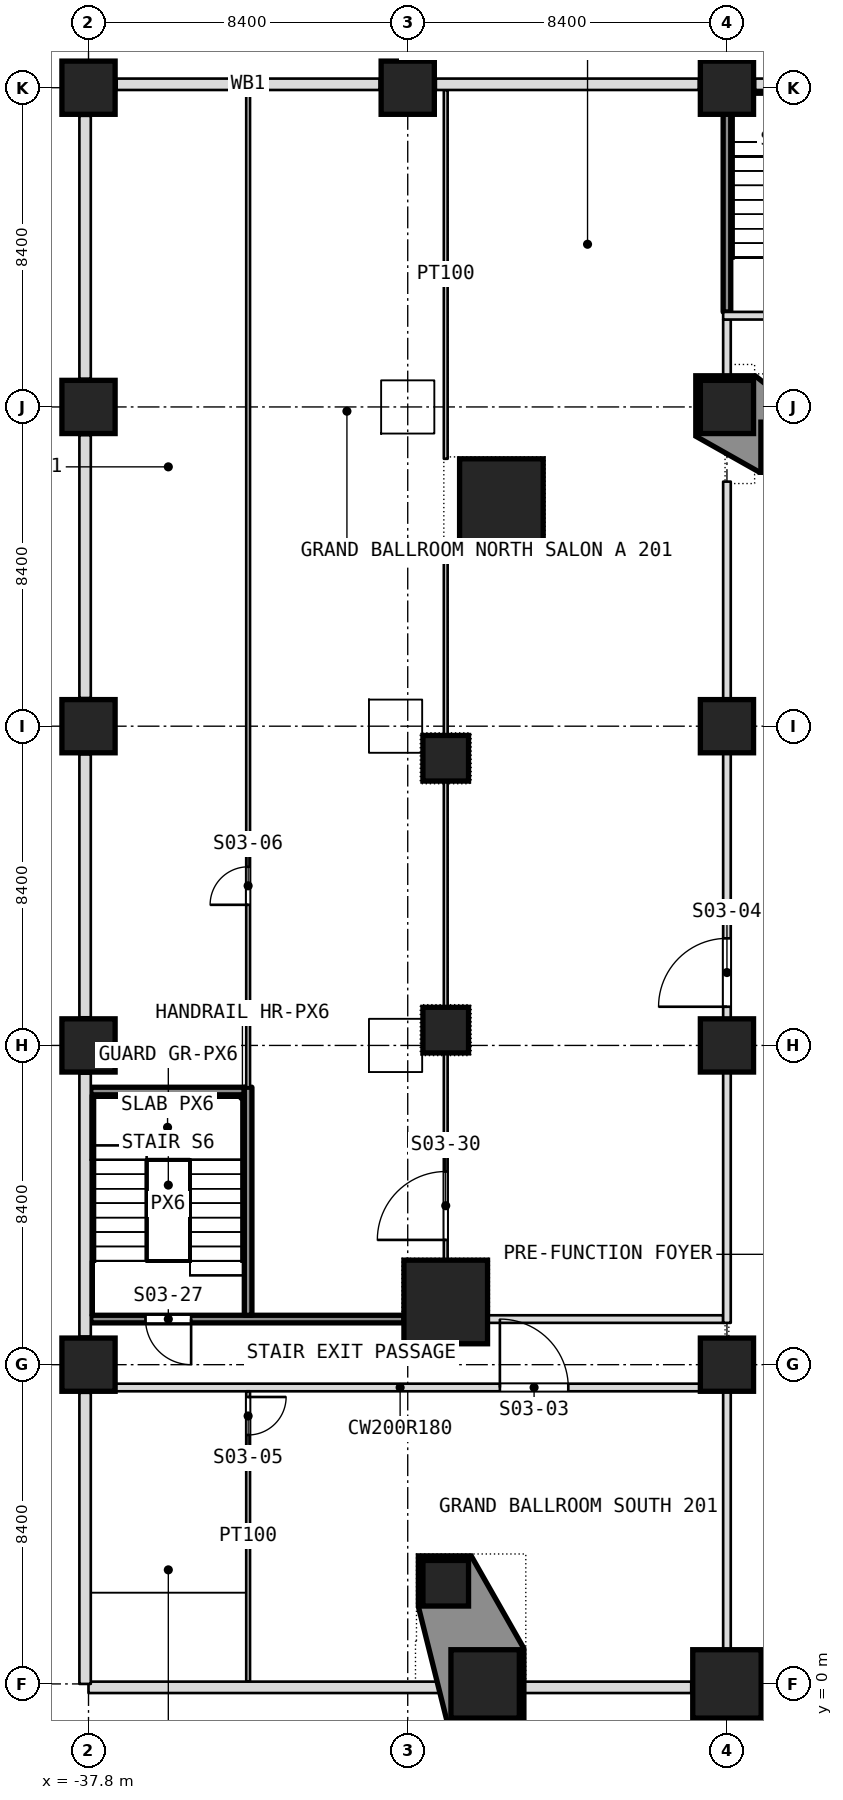
"""IFC4 building model, lengths in metres.
Left out: names, types, materials, properties, quantities, classifications, styles, units other than length and angle.
Written with IfcOpenShell. Run it as: python <this file> out.ifc"""

import sys

from ifc_helpers import new_model, si_unit, direction, frame, frame_2d, origin, origin_2d, place, context, subcontext, project, spatial, polyline, rectangle, outline, extrude, element, fill, save


model = new_model("IFC4")
c1 = context("Model", 3, precision=1e-05, world=origin(), true_north=direction((0.0, 1.0)))
c2 = subcontext(c1, "Body", "Model", "MODEL_VIEW")
j1 = project(units=[si_unit("LENGTHUNIT", "METRE"), si_unit("PLANEANGLEUNIT", "RADIAN")], contexts=[c1])
p1 = place(None, origin())
s1 = spatial("IfcSite", under=j1, at=p1, CompositionType="ELEMENT")
p2 = place(p1, origin())
s2 = spatial("IfcBuilding", under=s1, at=p2, CompositionType="ELEMENT")
p3 = place(p2, frame((0.0, 0.0, 13.0)))
s3 = spatial("IfcBuildingStorey", under=s2, at=p3, CompositionType="ELEMENT", Elevation=13.0)
p4 = place(p3, frame((-21.0, 0.0, 0.0), z_axis=(0.0, 0.0, 1.0), x_axis=(1.0, 0.0, 0.0)))
e1 = element("IfcColumn", 1, at=p4, inside=s3, PredefinedType="COLUMN", context=c2, shape_type="SweptSolid", body=[
    extrude(rectangle(XDim=1.8, YDim=1.8, at=origin_2d()), origin(), (0.0, 0.0, 1.0), 8.0),
])
for number, where, z_axis, x_axis in (
    (2, (-37.8, 8.4, 0.0), (0.0, 0.0, 1.0), (1.0, 0.0, 0.0)),
    (3, (-21.0, 8.4, 0.0), (0.0, 0.0, 1.0), (1.0, 0.0, 0.0)),
    (4, (-37.8, 16.8, 0.0), (0.0, 0.0, 1.0), (1.0, 0.0, 0.0)),
    (5, (-21.0, 16.8, 0.0), (0.0, 0.0, 1.0), (1.0, 0.0, 0.0)),
    (6, (-37.8, 25.2, 0.0), (0.0, 0.0, 1.0), (1.0, 0.0, 0.0)),
    (7, (-21.0, 25.2, 0.0), (0.0, 0.0, 1.0), (1.0, 0.0, 0.0)),
    (8, (-37.8, 33.6, 0.0), (0.0, 0.0, 1.0), (1.0, 0.0, 0.0)),
    (9, (-21.0, 33.6, 0.0), (0.0, 0.0, 1.0), (1.0, 0.0, 0.0)),
    (10, (-37.8, 42.0, 0.0), (0.0, 0.0, 1.0), (1.0, 0.0, 0.0)),
    (11, (-29.4, 42.0, 0.0), (0.0, 0.0, 1.0), (1.0, 0.0, 0.0)),
    (12, (-21.0, 42.0, 0.0), (0.0, 0.0, 1.0), (1.0, 0.0, 0.0)),
):
    element("IfcColumn", number, at=place(p3, frame(where, z_axis=z_axis, x_axis=x_axis)), inside=s3, PredefinedType="COLUMN", context=c2, shape_type="SweptSolid", body=[
        extrude(rectangle(XDim=1.4, YDim=1.4, at=origin_2d()), origin(), (0.0, 0.0, 1.0), 8.0),
    ])
p5 = place(p3, frame((-27.363, 0.0, 0.0), z_axis=(0.0, 0.0, 1.0), x_axis=(1.0, 0.0, 0.0)))
e13 = element("IfcColumn", 13, at=p5, inside=s3, PredefinedType="COLUMN", context=c2, shape_type="SweptSolid", body=[
    extrude(rectangle(XDim=1.8, YDim=1.8, at=origin_2d()), origin(), (0.0, 0.0, 1.0), 8.0),
])
for number, where, z_axis, x_axis in (
    (14, (-28.4, 10.05, 0.0), (0.0, 0.0, 1.0), (1.0, 0.0, 0.0)),
    (15, (-26.936, 31.135, 0.0), (0.0, 0.0, 1.0), (1.0, 0.0, 0.0)),
):
    element("IfcColumn", number, at=place(p3, frame(where, z_axis=z_axis, x_axis=x_axis)), inside=s3, PredefinedType="COLUMN", context=c2, shape_type="SweptSolid", body=[
        extrude(rectangle(XDim=2.2, YDim=2.2, at=origin_2d()), origin(), (0.0, 0.0, 1.0), 8.0),
    ])
p6 = place(p3, frame((-37.8, 2.4, 1.0), z_axis=(-1.0, 0.0, 0.0), x_axis=(0.0, -0.183897703887, 0.982945387346)))
e16 = element("IfcWall", 16, at=p6, inside=s3, PredefinedType="SOLIDWALL", context=c2, shape_type="SweptSolid", body=[
    extrude(outline(polyline([(0.0, 0.0), (6.525, 0.0), (7.156, -0.182), (6.881, 1.287), (0.0, 0.0)])), origin(), (0.0, 0.0, -1.0), 4.2),
])
for number, where, z_axis, x_axis in (
    (17, (-28.4, 2.649, 0.0), (0.0, 0.0, 1.0), (1.0, 0.0, 0.0)),
    (18, (-28.4, 17.203, 0.0), (0.0, 0.0, 1.0), (1.0, 0.0, 0.0)),
    (19, (-28.4, 24.356, 0.0), (0.0, 0.0, 1.0), (1.0, 0.0, 0.0)),
    (20, (-19.507, 32.6, 0.0), (0.0, 0.0, 1.0), (1.0, 0.0, 0.0)),
):
    element("IfcColumn", number, at=place(p3, frame(where, z_axis=z_axis, x_axis=x_axis)), inside=s3, PredefinedType="COLUMN", context=c2, shape_type="SweptSolid", body=[
        extrude(rectangle(XDim=1.2, YDim=1.2, at=origin_2d()), origin(), (0.0, 0.0, 1.0), 8.0),
    ])
p7 = place(p3, frame((-38.1, 7.8, 0.0), z_axis=(0.0, 0.0, 1.0), x_axis=(1.0, 0.0, 0.0)))
e21 = element("IfcWall", 21, at=p7, inside=s3, PredefinedType="PARTITIONING", context=c2, shape_type="SweptSolid", body=[
    extrude(rectangle(XDim=17.0, YDim=0.2, at=frame_2d((8.5, 0.0))), origin(), (0.0, 0.0, 1.0), 7.68),
])
p8 = place(p7, frame((11.125, 0.0, 0.0)))
e22 = element("IfcOpeningElement", 22, at=p8, cuts=e21, PredefinedType="OPENING", context=c2, shape_type="SweptSolid", body=[
    extrude(rectangle(XDim=1.8, YDim=2.1, at=frame_2d((0.9, 1.05))), frame((0.0, 0.1, 0.0), z_axis=(0.0, -1.0, 0.0), x_axis=(1.0, 0.0, 0.0)), (0.0, 0.0, 1.0), 0.2),
])
p9 = place(p3, frame((-37.74, 9.6, 0.0), z_axis=(0.0, 0.0, 1.0), x_axis=(1.0, 0.0, 0.0)))
e23 = element("IfcWall", 23, at=p9, inside=s3, PredefinedType="PARTITIONING", context=c2, shape_type="SweptSolid", body=[
    extrude(rectangle(XDim=8.24, YDim=0.2, at=frame_2d((4.12, 0.0))), origin(), (0.0, 0.0, 1.0), 7.68),
])
p10 = place(p9, frame((1.44, 0.0, 0.0)))
e24 = element("IfcOpeningElement", 24, at=p10, cuts=e23, PredefinedType="OPENING", context=c2, shape_type="SweptSolid", body=[
    extrude(rectangle(XDim=1.2, YDim=2.1, at=frame_2d((0.6, 1.05))), frame((0.0, 0.1, 0.0), z_axis=(0.0, -1.0, 0.0), x_axis=(1.0, 0.0, 0.0)), (0.0, 0.0, 1.0), 0.2),
])
p11 = place(p3, frame((-27.3, 9.6, 0.0), z_axis=(0.0, 0.0, 1.0), x_axis=(1.0, 0.0, 0.0)))
e25 = element("IfcWall", 25, at=p11, inside=s3, PredefinedType="PARTITIONING", context=c2, shape_type="SweptSolid", body=[
    extrude(rectangle(XDim=6.2, YDim=0.2, at=frame_2d((3.1, 0.0))), origin(), (0.0, 0.0, 1.0), 7.68),
])
p12 = place(p3, frame((-37.74, 15.6, 0.0), z_axis=(0.0, 0.0, 1.0), x_axis=(1.0, 0.0, 0.0)))
e26 = element("IfcWall", 26, at=p12, inside=s3, PredefinedType="PARTITIONING", context=c2, shape_type="SweptSolid", body=[
    extrude(rectangle(XDim=4.04, YDim=0.2, at=frame_2d((2.02, 0.0))), origin(), (0.0, 0.0, 1.0), 7.68),
])
p13 = place(p3, frame((-21.0, -0.3, 0.0), z_axis=(0.0, 0.0, 1.0), x_axis=(0.0, 1.0, 0.0)))
e27 = element("IfcWall", 27, at=p13, inside=s3, PredefinedType="PARTITIONING", context=c2, shape_type="SweptSolid", body=[
    extrude(rectangle(XDim=8.2, YDim=0.2, at=frame_2d((4.1, 0.0))), origin(), (0.0, 0.0, 1.0), 7.68),
])
p14 = place(p3, frame((-21.0, 9.5, 0.0), z_axis=(0.0, 0.0, 1.0), x_axis=(0.0, 1.0, 0.0)))
e28 = element("IfcWall", 28, at=p14, inside=s3, PredefinedType="PARTITIONING", context=c2, shape_type="SweptSolid", body=[
    extrude(rectangle(XDim=22.135, YDim=0.2, at=frame_2d((11.067, 0.0))), origin(), (0.0, 0.0, 1.0), 7.68),
])
p15 = place(p14, frame((8.318, 0.0, 0.0)))
e29 = element("IfcOpeningElement", 29, at=p15, cuts=e28, PredefinedType="OPENING", context=c2, shape_type="SweptSolid", body=[
    extrude(rectangle(XDim=1.8, YDim=2.1, at=frame_2d((0.9, 1.05))), frame((0.0, 0.1, 0.0), z_axis=(0.0, -1.0, 0.0), x_axis=(1.0, 0.0, 0.0)), (0.0, 0.0, 1.0), 0.2),
])
p16 = place(p3, frame((-21.0, 34.42, 0.0), z_axis=(0.0, 0.0, 1.0), x_axis=(0.0, 1.0, 0.0)))
e30 = element("IfcWall", 30, at=p16, inside=s3, PredefinedType="PARTITIONING", context=c2, shape_type="SweptSolid", body=[
    extrude(rectangle(XDim=1.48, YDim=0.2, at=frame_2d((0.74, 0.0))), origin(), (0.0, 0.0, 1.0), 7.68),
])
p17 = place(p3, frame((-21.0, 36.1, 0.0), z_axis=(0.0, 0.0, 1.0), x_axis=(0.0, 1.0, 0.0)))
e31 = element("IfcWall", 31, at=p17, inside=s3, PredefinedType="PARTITIONING", context=c2, shape_type="SweptSolid", body=[
    extrude(rectangle(XDim=6.2, YDim=0.2, at=frame_2d((3.1, 0.0))), origin(), (0.0, 0.0, 1.0), 7.68),
])
p18 = place(p3, frame((-28.4, 11.15, 0.0), z_axis=(0.0, 0.0, 1.0), x_axis=(0.0, 1.0, 0.0)))
e32 = element("IfcWall", 32, at=p18, inside=s3, PredefinedType="PARTITIONING", context=c2, shape_type="SweptSolid", body=[
    extrude(rectangle(XDim=5.433, YDim=0.1, at=frame_2d((2.717, 0.0))), origin(), (0.0, 0.0, 1.0), 7.68),
])
p19 = place(p18, frame((0.533, 0.0, 0.0)))
e33 = element("IfcOpeningElement", 33, at=p19, cuts=e32, PredefinedType="OPENING", context=c2, shape_type="SweptSolid", body=[
    extrude(rectangle(XDim=1.8, YDim=2.1, at=frame_2d((0.9, 1.05))), frame((0.0, 0.05, 0.0), z_axis=(0.0, -1.0, 0.0), x_axis=(1.0, 0.0, 0.0)), (0.0, 0.0, 1.0), 0.1),
])
p20 = place(p3, frame((-28.4, 17.823, 0.0), z_axis=(0.0, 0.0, 1.0), x_axis=(0.0, 1.0, 0.0)))
e34 = element("IfcWall", 34, at=p20, inside=s3, PredefinedType="PARTITIONING", context=c2, shape_type="SweptSolid", body=[
    extrude(rectangle(XDim=5.913, YDim=0.1, at=frame_2d((2.957, 0.0))), origin(), (0.0, 0.0, 1.0), 7.68),
])
p21 = place(p3, frame((-28.4, 24.976, 0.0), z_axis=(0.0, 0.0, 1.0), x_axis=(0.0, 1.0, 0.0)))
e35 = element("IfcWall", 35, at=p21, inside=s3, PredefinedType="PARTITIONING", context=c2, shape_type="SweptSolid", body=[
    extrude(rectangle(XDim=5.06, YDim=0.1, at=frame_2d((2.53, 0.0))), origin(), (0.0, 0.0, 1.0), 7.68),
])
p22 = place(p3, frame((-28.4, 32.236, 0.0), z_axis=(0.0, 0.0, 1.0), x_axis=(0.0, 1.0, 0.0)))
e36 = element("IfcWall", 36, at=p22, inside=s3, PredefinedType="PARTITIONING", context=c2, shape_type="SweptSolid", body=[
    extrude(rectangle(XDim=9.704, YDim=0.1, at=frame_2d((4.852, 0.0))), origin(), (0.0, 0.0, 1.0), 7.68),
])
p23 = place(p3, frame((-33.6, 9.7, 0.0), z_axis=(0.0, 0.0, 1.0), x_axis=(0.0, 1.0, 0.0)))
e37 = element("IfcWall", 37, at=p23, inside=s3, PredefinedType="PARTITIONING", context=c2, shape_type="SweptSolid", body=[
    extrude(rectangle(XDim=6.0, YDim=0.2, at=frame_2d((3.0, 0.0))), origin(), (0.0, 0.0, 1.0), 7.68),
])
p24 = place(p3, frame((-33.6, 0.06, 0.0), z_axis=(0.0, 0.0, 1.0), x_axis=(0.0, 1.0, 0.0)))
e38 = element("IfcWall", 38, at=p24, inside=s3, PredefinedType="PARTITIONING", context=c2, shape_type="SweptSolid", body=[
    extrude(rectangle(XDim=7.64, YDim=0.1, at=frame_2d((3.82, 0.0))), origin(), (0.0, 0.0, 1.0), 7.68),
])
p25 = place(p24, frame((6.49, 0.0, 0.0)))
e39 = element("IfcOpeningElement", 39, at=p25, cuts=e38, PredefinedType="OPENING", context=c2, shape_type="SweptSolid", body=[
    extrude(rectangle(XDim=1.0, YDim=2.1, at=frame_2d((0.5, 1.05))), frame((0.0, 0.05, 0.0), z_axis=(0.0, -1.0, 0.0), x_axis=(1.0, 0.0, 0.0)), (0.0, 0.0, 1.0), 0.1),
])
p26 = place(p3, frame((-33.6, 15.7, 0.0), z_axis=(0.0, 0.0, 1.0), x_axis=(0.0, 1.0, 0.0)))
e40 = element("IfcWall", 40, at=p26, inside=s3, PredefinedType="PARTITIONING", context=c2, shape_type="SweptSolid", body=[
    extrude(rectangle(XDim=26.24, YDim=0.1, at=frame_2d((13.12, 0.0))), origin(), (0.0, 0.0, 1.0), 7.68),
])
p27 = place(p26, frame((4.8, 0.0, 0.0)))
e41 = element("IfcOpeningElement", 41, at=p27, cuts=e40, PredefinedType="OPENING", context=c2, shape_type="SweptSolid", body=[
    extrude(rectangle(XDim=1.0, YDim=2.1, at=frame_2d((0.5, 1.05))), frame((0.0, 0.05, 0.0), z_axis=(0.0, -1.0, 0.0), x_axis=(1.0, 0.0, 0.0)), (0.0, 0.0, 1.0), 0.1),
])
p28 = place(p3, frame((-21.1, 36.0, 0.0), z_axis=(0.0, 0.0, 1.0), x_axis=(1.0, 0.0, 0.0)))
e42 = element("IfcWall", 42, at=p28, inside=s3, PredefinedType="PARTITIONING", context=c2, shape_type="SweptSolid", body=[
    extrude(rectangle(XDim=23.3, YDim=0.2, at=frame_2d((11.65, 0.0))), origin(), (0.0, 0.0, 1.0), 7.68),
])
p29 = place(p28, frame((1.6, 0.0, 0.0)))
e43 = element("IfcOpeningElement", 43, at=p29, cuts=e42, PredefinedType="OPENING", context=c2, shape_type="SweptSolid", body=[
    extrude(rectangle(XDim=1.2, YDim=2.1, at=frame_2d((0.6, 1.05))), frame((0.0, 0.1, 0.0), z_axis=(0.0, -1.0, 0.0), x_axis=(1.0, 0.0, 0.0)), (0.0, 0.0, 1.0), 0.2),
])
p30 = place(p28, frame((11.15, 0.0, 0.0)))
e44 = element("IfcOpeningElement", 44, at=p30, cuts=e42, PredefinedType="OPENING", context=c2, shape_type="SweptSolid", body=[
    extrude(rectangle(XDim=1.0, YDim=2.1, at=frame_2d((0.5, 1.05))), frame((0.0, 0.1, 0.0), z_axis=(0.0, -1.0, 0.0), x_axis=(1.0, 0.0, 0.0)), (0.0, 0.0, 1.0), 0.2),
])
p31 = place(p28, frame((20.5, 0.0, 0.0)))
e45 = element("IfcOpeningElement", 45, at=p31, cuts=e42, PredefinedType="OPENING", context=c2, shape_type="SweptSolid", body=[
    extrude(rectangle(XDim=1.2, YDim=2.1, at=frame_2d((0.6, 1.05))), frame((0.0, 0.1, 0.0), z_axis=(0.0, -1.0, 0.0), x_axis=(1.0, 0.0, 0.0)), (0.0, 0.0, 1.0), 0.2),
])
p32 = place(p3, frame((-37.8, -0.09, 0.0), z_axis=(0.0, 0.0, 1.0), x_axis=(1.0, 0.0, 0.0)))
e46 = element("IfcWall", 46, at=p32, inside=s3, PredefinedType="NOTDEFINED", context=c2, shape_type="SweptSolid", body=[
    extrude(rectangle(XDim=9.497, YDim=0.3, at=frame_2d((4.749, 0.0))), origin(), (0.0, 0.0, 1.0), 6.78),
])
p33 = place(p3, frame((-26.423, -0.09, 0.0), z_axis=(0.0, 0.0, 1.0), x_axis=(1.0, 0.0, 0.0)))
e47 = element("IfcWall", 47, at=p33, inside=s3, PredefinedType="NOTDEFINED", context=c2, shape_type="SweptSolid", body=[
    extrude(rectangle(XDim=4.483, YDim=0.3, at=frame_2d((2.242, 0.0))), origin(), (0.0, 0.0, 1.0), 6.78),
])
p34 = place(p3, frame((-20.06, -0.09, 0.0), z_axis=(0.0, 0.0, 1.0), x_axis=(1.0, 0.0, 0.0)))
e48 = element("IfcWall", 48, at=p34, inside=s3, PredefinedType="NOTDEFINED", context=c2, shape_type="SweptSolid", body=[
    extrude(rectangle(XDim=3.26, YDim=0.3, at=frame_2d((1.63, 0.0))), origin(), (0.0, 0.0, 1.0), 8.0),
])
for number, where, z_axis, x_axis in (
    (49, (-13.34, 42.09, 0.0), (0.0, 0.0, 1.0), (-1.0, 0.0, 0.0)),
    (50, (-21.74, 42.09, 0.0), (0.0, 0.0, 1.0), (-1.0, 0.0, 0.0)),
):
    element("IfcWall", number, at=place(p3, frame(where, z_axis=z_axis, x_axis=x_axis)), inside=s3, PredefinedType="NOTDEFINED", context=c2, shape_type="SweptSolid", body=[
        extrude(rectangle(XDim=6.92, YDim=0.3, at=frame_2d((3.46, 0.0))), origin(), (0.0, 0.0, 1.0), 6.78),
    ])
p35 = place(p3, frame((-30.14, 42.09, 0.0), z_axis=(0.0, 0.0, 1.0), x_axis=(-1.0, 0.0, 0.0)))
e51 = element("IfcWall", 51, at=p35, inside=s3, PredefinedType="NOTDEFINED", context=c2, shape_type="SweptSolid", body=[
    extrude(rectangle(XDim=6.92, YDim=0.3, at=frame_2d((3.46, 0.0))), origin(), (0.0, 0.0, 1.0), 6.78),
])
p36 = place(p3, frame((-37.89, 41.26, 0.0), z_axis=(0.0, 0.0, 1.0), x_axis=(0.0, -1.0, 0.0)))
e52 = element("IfcWall", 52, at=p36, inside=s3, PredefinedType="NOTDEFINED", context=c2, shape_type="SweptSolid", body=[
    extrude(rectangle(XDim=6.92, YDim=0.3, at=frame_2d((3.46, 0.0))), origin(), (0.0, 0.0, 1.0), 6.78),
])
p37 = place(p3, frame((-37.89, 32.86, 0.0), z_axis=(0.0, 0.0, 1.0), x_axis=(0.0, -1.0, 0.0)))
e53 = element("IfcWall", 53, at=p37, inside=s3, PredefinedType="NOTDEFINED", context=c2, shape_type="SweptSolid", body=[
    extrude(rectangle(XDim=6.92, YDim=0.3, at=frame_2d((3.46, 0.0))), origin(), (0.0, 0.0, 1.0), 6.78),
])
p38 = place(p3, frame((-37.89, 24.46, 0.0), z_axis=(0.0, 0.0, 1.0), x_axis=(0.0, -1.0, 0.0)))
e54 = element("IfcWall", 54, at=p38, inside=s3, PredefinedType="NOTDEFINED", context=c2, shape_type="SweptSolid", body=[
    extrude(rectangle(XDim=6.92, YDim=0.3, at=frame_2d((3.46, 0.0))), origin(), (0.0, 0.0, 1.0), 6.78),
])
p39 = place(p3, frame((-37.89, 16.06, 0.0), z_axis=(0.0, 0.0, 1.0), x_axis=(0.0, -1.0, 0.0)))
e55 = element("IfcWall", 55, at=p39, inside=s3, PredefinedType="NOTDEFINED", context=c2, shape_type="SweptSolid", body=[
    extrude(rectangle(XDim=6.92, YDim=0.3, at=frame_2d((3.46, 0.0))), origin(), (0.0, 0.0, 1.0), 8.0),
])
p40 = place(p3, frame((-37.89, 7.66, 0.0), z_axis=(0.0, 0.0, 1.0), x_axis=(0.0, -1.0, 0.0)))
e56 = element("IfcWall", 56, at=p40, inside=s3, PredefinedType="NOTDEFINED", context=c2, shape_type="SweptSolid", body=[
    extrude(rectangle(XDim=7.66, YDim=0.3, at=frame_2d((3.83, 0.0))), origin(), (0.0, 0.0, 1.0), 6.78),
])
p41 = place(p3, origin())
e57 = element("IfcWall", 57, at=p41, inside=s3, PredefinedType="SOLIDWALL", context=c2, shape_type="SweptSolid", body=[
    extrude(outline(polyline([(-29.12, 2.034), (-29.12, 3.369), (-27.73, 3.369), (-26.343, 0.932), (-26.343, -1.02), (-28.357, -1.02), (-29.12, 2.034)]), holes=[polyline([(-28.263, -0.9), (-26.463, -0.9), (-26.463, 0.9), (-28.263, 0.9), (-28.263, -0.9)]), polyline([(-29.0, 2.049), (-27.8, 2.049), (-27.8, 3.249), (-29.0, 3.249), (-29.0, 2.049)])]), origin(), (0.0, 0.0, 1.0), 8.0),
])
p42 = place(p3, origin())
e58 = element("IfcWall", 58, at=p42, inside=s3, PredefinedType="SOLIDWALL", context=c2, shape_type="SweptSolid", body=[
    extrude(outline(polyline([(-21.82, 34.42), (-20.258, 34.42), (-18.787, 33.258), (-18.787, 31.88), (-20.138, 31.88), (-21.82, 32.83), (-21.82, 34.42)]), holes=[polyline([(-18.907, 32.0), (-18.907, 33.2), (-20.107, 33.2), (-20.107, 32.0), (-18.907, 32.0)]), polyline([(-20.3, 32.9), (-20.3, 34.3), (-21.7, 34.3), (-21.7, 32.9), (-20.3, 32.9)])]), origin(), (0.0, 0.0, 1.0), 8.0),
])
p43 = place(p8, origin())
e59 = element("IfcDoor", 59, at=p43, inside=s3, OperationType="DOUBLE_DOOR_SINGLE_SWING", PredefinedType="DOOR", context=c2, shape_type="SweptSolid", body=[
    extrude(rectangle(XDim=1.8, YDim=2.1, at=frame_2d((0.9, 1.05))), frame((0.0, 0.025, 0.0), z_axis=(0.0, -1.0, 0.0), x_axis=(1.0, 0.0, 0.0)), (0.0, 0.0, 1.0), 0.05),
])
fill(e22, e59)
p44 = place(p15, origin())
e60 = element("IfcDoor", 60, at=p44, inside=s3, OperationType="DOUBLE_DOOR_SINGLE_SWING", PredefinedType="DOOR", context=c2, shape_type="SweptSolid", body=[
    extrude(rectangle(XDim=1.8, YDim=2.1, at=frame_2d((0.9, 1.05))), frame((0.0, 0.025, 0.0), z_axis=(0.0, -1.0, 0.0), x_axis=(1.0, 0.0, 0.0)), (0.0, 0.0, 1.0), 0.05),
])
fill(e29, e60)
p45 = place(p25, origin())
e61 = element("IfcDoor", 61, at=p45, inside=s3, OperationType="SINGLE_SWING_RIGHT", PredefinedType="DOOR", context=c2, shape_type="SweptSolid", body=[
    extrude(rectangle(XDim=1.0, YDim=2.1, at=frame_2d((0.5, 1.05))), frame((0.0, 0.025, 0.0), z_axis=(0.0, -1.0, 0.0), x_axis=(1.0, 0.0, 0.0)), (0.0, 0.0, 1.0), 0.05),
])
fill(e39, e61)
p46 = place(p27, origin())
e62 = element("IfcDoor", 62, at=p46, inside=s3, OperationType="SINGLE_SWING_LEFT", PredefinedType="DOOR", context=c2, shape_type="SweptSolid", body=[
    extrude(rectangle(XDim=1.0, YDim=2.1, at=frame_2d((0.5, 1.05))), frame((0.0, 0.025, 0.0), z_axis=(0.0, -1.0, 0.0), x_axis=(1.0, 0.0, 0.0)), (0.0, 0.0, 1.0), 0.05),
])
fill(e41, e62)
p47 = place(p10, origin())
e63 = element("IfcDoor", 63, at=p47, inside=s3, OperationType="SINGLE_SWING_RIGHT", PredefinedType="DOOR", context=c2, shape_type="SweptSolid", body=[
    extrude(rectangle(XDim=1.2, YDim=2.1, at=frame_2d((0.6, 1.05))), frame((0.0, 0.025, 0.0), z_axis=(0.0, -1.0, 0.0), x_axis=(1.0, 0.0, 0.0)), (0.0, 0.0, 1.0), 0.05),
])
fill(e24, e63)
p48 = place(p19, origin())
e64 = element("IfcDoor", 64, at=p48, inside=s3, OperationType="DOUBLE_DOOR_SINGLE_SWING", PredefinedType="DOOR", context=c2, shape_type="SweptSolid", body=[
    extrude(rectangle(XDim=1.8, YDim=2.1, at=frame_2d((0.9, 1.05))), frame((0.0, 0.025, 0.0), z_axis=(0.0, -1.0, 0.0), x_axis=(1.0, 0.0, 0.0)), (0.0, 0.0, 1.0), 0.05),
])
fill(e33, e64)
save(model, sys.argv[1])
